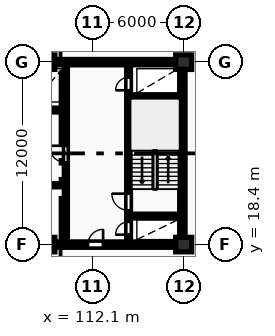
"""IFC4 building model, lengths in metres.
Left out: names, types, materials, properties, quantities, classifications, styles, units other than length and angle.
Written with IfcOpenShell. Run it as: python <this file> out.ifc"""

import sys

from ifc_helpers import new_model, si_unit, direction, frame, frame_2d, origin, origin_2d, place, context, subcontext, project, spatial, rectangle, extrude, element, fill, save


model = new_model("IFC4")
c1 = context("Model", 3, precision=1e-05, world=origin(), true_north=direction((0.0, 1.0)))
c2 = subcontext(c1, "Body", "Model", "MODEL_VIEW")
j1 = project(units=[si_unit("LENGTHUNIT", "METRE"), si_unit("PLANEANGLEUNIT", "RADIAN")], contexts=[c1])
p1 = place(None, origin())
s1 = spatial("IfcSite", under=j1, at=p1, CompositionType="ELEMENT")
p2 = place(p1, origin())
s2 = spatial("IfcBuilding", under=s1, at=p2, CompositionType="ELEMENT")
p3 = place(p2, frame((0.0, 0.0, -3.6)))
s3 = spatial("IfcBuildingStorey", under=s2, at=p3, CompositionType="ELEMENT", Elevation=-3.6)
for number, where, z_axis, x_axis in (
    (1, (109.1, 18.4, 0.0), (0.0, 0.0, 1.0), (1.0, 0.0, 0.0)),
    (2, (109.1, 30.4, 0.0), (0.0, 0.0, 1.0), (1.0, 0.0, 0.0)),
    (3, (118.1, 18.4, 0.0), (0.0, 0.0, 1.0), (1.0, 0.0, 0.0)),
    (4, (118.1, 30.4, 0.0), (0.0, 0.0, 1.0), (1.0, 0.0, 0.0)),
):
    element("IfcColumn", number, at=place(p3, frame(where, z_axis=z_axis, x_axis=x_axis)), inside=s3, PredefinedType="COLUMN", context=c2, shape_type="SweptSolid", body=[
        extrude(rectangle(XDim=1.05, YDim=0.95, at=origin_2d()), origin(), (0.0, 0.0, 1.0), 3.6),
    ])
p4 = place(p3, frame((81.925, 30.4, 0.0), z_axis=(0.0, 0.0, 1.0), x_axis=(1.0, 0.0, 0.0)))
e5 = element("IfcWall", 5, at=p4, inside=s3, PredefinedType="SHEAR", context=c2, shape_type="SweptSolid", body=[
    extrude(rectangle(XDim=36.265, YDim=0.35, at=frame_2d((18.132, 0.0))), origin(), (0.0, 0.0, 1.0), 3.6),
])
p5 = place(p3, frame((118.015, 18.575, 0.0), z_axis=(0.0, 0.0, 1.0), x_axis=(0.0, 1.0, 0.0)))
e6 = element("IfcWall", 6, at=p5, inside=s3, PredefinedType="SHEAR", context=c2, shape_type="SweptSolid", body=[
    extrude(rectangle(XDim=11.65, YDim=0.35, at=frame_2d((5.825, 0.0))), origin(), (0.0, 0.0, 1.0), 3.6),
])
p6 = place(p3, frame((81.925, 18.4, 0.0), z_axis=(0.0, 0.0, 1.0), x_axis=(1.0, 0.0, 0.0)))
e7 = element("IfcWall", 7, at=p6, inside=s3, PredefinedType="SHEAR", context=c2, shape_type="SweptSolid", body=[
    extrude(rectangle(XDim=36.265, YDim=0.35, at=frame_2d((18.132, 0.0))), origin(), (0.0, 0.0, 1.0), 3.6),
])
p7 = place(p6, frame((5.675, 0.0, 0.0)))
e8 = element("IfcOpeningElement", 8, at=p7, cuts=e7, PredefinedType="OPENING", context=c2, shape_type="SweptSolid", body=[
    extrude(rectangle(XDim=1.0, YDim=2.15, at=frame_2d((0.5, 1.075))), frame((0.0, 0.185, 0.0), z_axis=(0.0, -1.0, 0.0), x_axis=(1.0, 0.0, 0.0)), (0.0, 0.0, 1.0), 0.37),
])
p8 = place(p6, frame((21.925, 0.0, 0.0)))
e9 = element("IfcOpeningElement", 9, at=p8, cuts=e7, PredefinedType="OPENING", context=c2, shape_type="SweptSolid", body=[
    extrude(rectangle(XDim=1.5, YDim=2.2, at=frame_2d((0.75, 1.1))), frame((0.0, 0.185, 0.0), z_axis=(0.0, -1.0, 0.0), x_axis=(1.0, 0.0, 0.0)), (0.0, 0.0, 1.0), 0.37),
])
p9 = place(p6, frame((29.875, 0.0, 0.0)))
e10 = element("IfcOpeningElement", 10, at=p9, cuts=e7, PredefinedType="OPENING", context=c2, shape_type="SweptSolid", body=[
    extrude(rectangle(XDim=1.0, YDim=2.15, at=frame_2d((0.5, 1.075))), frame((0.0, 0.185, 0.0), z_axis=(0.0, -1.0, 0.0), x_axis=(1.0, 0.0, 0.0)), (0.0, 0.0, 1.0), 0.37),
])
p10 = place(p3, frame((99.68, 27.25, 0.0), z_axis=(0.0, 0.0, 1.0), x_axis=(1.0, 0.0, 0.0)))
e11 = element("IfcWall", 11, at=p10, inside=s3, PredefinedType="SHEAR", context=c2, shape_type="SweptSolid", body=[
    extrude(rectangle(XDim=10.54, YDim=0.25, at=frame_2d((5.27, 0.0))), origin(), (0.0, 0.0, 1.0), 3.6),
])
p11 = place(p10, frame((8.92, 0.0, 0.0)))
e12 = element("IfcOpeningElement", 12, at=p11, cuts=e11, PredefinedType="OPENING", context=c2, shape_type="SweptSolid", body=[
    extrude(rectangle(XDim=0.85, YDim=2.05, at=frame_2d((0.425, 1.025))), frame((0.0, 0.135, 0.0), z_axis=(0.0, -1.0, 0.0), x_axis=(1.0, 0.0, 0.0)), (0.0, 0.0, 1.0), 0.27),
])
p12 = place(p3, frame((91.08, 22.3, 0.0), z_axis=(0.0, 0.0, 1.0), x_axis=(1.0, 0.0, 0.0)))
e13 = element("IfcWall", 13, at=p12, inside=s3, PredefinedType="PARTITIONING", context=c2, shape_type="SweptSolid", body=[
    extrude(rectangle(XDim=19.14, YDim=0.2, at=frame_2d((9.57, 0.0))), origin(), (0.0, 0.0, 1.0), 3.3),
])
p13 = place(p12, frame((1.15, 0.0, 0.0)))
e14 = element("IfcOpeningElement", 14, at=p13, cuts=e13, PredefinedType="OPENING", context=c2, shape_type="SweptSolid", body=[
    extrude(rectangle(XDim=0.85, YDim=2.05, at=frame_2d((0.425, 1.025))), frame((0.0, 0.11, 0.0), z_axis=(0.0, -1.0, 0.0), x_axis=(1.0, 0.0, 0.0)), (0.0, 0.0, 1.0), 0.22),
])
p14 = place(p12, frame((3.2, 0.0, 0.0)))
e15 = element("IfcOpeningElement", 15, at=p14, cuts=e13, PredefinedType="OPENING", context=c2, shape_type="SweptSolid", body=[
    extrude(rectangle(XDim=0.85, YDim=2.05, at=frame_2d((0.425, 1.025))), frame((0.0, 0.11, 0.0), z_axis=(0.0, -1.0, 0.0), x_axis=(1.0, 0.0, 0.0)), (0.0, 0.0, 1.0), 0.22),
])
p15 = place(p12, frame((12.72, 0.0, 0.0)))
e16 = element("IfcOpeningElement", 16, at=p15, cuts=e13, PredefinedType="OPENING", context=c2, shape_type="SweptSolid", body=[
    extrude(rectangle(XDim=1.5, YDim=2.2, at=frame_2d((0.75, 1.1))), frame((0.0, 0.11, 0.0), z_axis=(0.0, -1.0, 0.0), x_axis=(1.0, 0.0, 0.0)), (0.0, 0.0, 1.0), 0.22),
])
p16 = place(p12, frame((6.42, 0.0, 0.0)))
e17 = element("IfcOpeningElement", 17, at=p16, cuts=e13, PredefinedType="OPENING", context=c2, shape_type="SweptSolid", body=[
    extrude(rectangle(XDim=0.92, YDim=2.08, at=frame_2d((0.46, 1.04))), frame((0.0, 0.11, 0.0), z_axis=(0.0, -1.0, 0.0), x_axis=(1.0, 0.0, 0.0)), (0.0, 0.0, 1.0), 0.22),
])
p17 = place(p12, frame((15.87, 0.0, 0.0)))
e18 = element("IfcOpeningElement", 18, at=p17, cuts=e13, PredefinedType="OPENING", context=c2, shape_type="SweptSolid", body=[
    extrude(rectangle(XDim=0.92, YDim=2.08, at=frame_2d((0.46, 1.04))), frame((0.0, 0.11, 0.0), z_axis=(0.0, -1.0, 0.0), x_axis=(1.0, 0.0, 0.0)), (0.0, 0.0, 1.0), 0.22),
])
p18 = place(p3, frame((110.35, 18.6, 0.0), z_axis=(0.0, 0.0, 1.0), x_axis=(0.0, 1.0, 0.0)))
e19 = element("IfcWall", 19, at=p18, inside=s3, PredefinedType="PARTITIONING", context=c2, shape_type="SweptSolid", body=[
    extrude(rectangle(XDim=11.6, YDim=0.2, at=frame_2d((5.8, 0.0))), origin(), (0.0, 0.0, 1.0), 3.3),
])
p19 = place(p18, frame((5.2, 0.0, 0.0)))
e20 = element("IfcOpeningElement", 20, at=p19, cuts=e19, PredefinedType="OPENING", context=c2, shape_type="SweptSolid", body=[
    extrude(rectangle(XDim=1.1, YDim=2.15, at=frame_2d((0.55, 1.075))), frame((0.0, 0.11, 0.0), z_axis=(0.0, -1.0, 0.0), x_axis=(1.0, 0.0, 0.0)), (0.0, 0.0, 1.0), 0.22),
])
p20 = place(p3, frame((114.475, 18.6, 0.0), z_axis=(0.0, 0.0, 1.0), x_axis=(0.0, 1.0, 0.0)))
e21 = element("IfcWall", 21, at=p20, inside=s3, PredefinedType="SHEAR", context=c2, shape_type="SweptSolid", body=[
    extrude(rectangle(XDim=11.6, YDim=0.25, at=frame_2d((5.8, 0.0))), origin(), (0.0, 0.0, 1.0), 3.6),
])
p21 = place(p20, frame((0.45, 0.0, 0.0)))
e22 = element("IfcOpeningElement", 22, at=p21, cuts=e21, PredefinedType="OPENING", context=c2, shape_type="SweptSolid", body=[
    extrude(rectangle(XDim=0.85, YDim=2.05, at=frame_2d((0.425, 1.025))), frame((0.0, 0.135, 0.0), z_axis=(0.0, -1.0, 0.0), x_axis=(1.0, 0.0, 0.0)), (0.0, 0.0, 1.0), 0.27),
])
p22 = place(p20, frame((2.05, 0.0, 0.0)))
e23 = element("IfcOpeningElement", 23, at=p22, cuts=e21, PredefinedType="OPENING", context=c2, shape_type="SweptSolid", body=[
    extrude(rectangle(XDim=1.1, YDim=2.1, at=frame_2d((0.55, 1.05))), frame((0.0, 0.135, 0.0), z_axis=(0.0, -1.0, 0.0), x_axis=(1.0, 0.0, 0.0)), (0.0, 0.0, 1.0), 0.27),
])
p23 = place(p20, frame((9.95, 0.0, 0.0)))
e24 = element("IfcOpeningElement", 24, at=p23, cuts=e21, PredefinedType="OPENING", context=c2, shape_type="SweptSolid", body=[
    extrude(rectangle(XDim=0.85, YDim=2.05, at=frame_2d((0.425, 1.025))), frame((0.0, 0.135, 0.0), z_axis=(0.0, -1.0, 0.0), x_axis=(1.0, 0.0, 0.0)), (0.0, 0.0, 1.0), 0.27),
])
for number, where, z_axis, x_axis in (
    (25, (114.6, 20.275, 0.0), (0.0, 0.0, 1.0), (1.0, 0.0, 0.0)),
    (26, (114.6, 28.125, 0.0), (0.0, 0.0, 1.0), (1.0, 0.0, 0.0)),
):
    element("IfcWall", number, at=place(p3, frame(where, z_axis=z_axis, x_axis=x_axis)), inside=s3, PredefinedType="SHEAR", context=c2, shape_type="SweptSolid", body=[
        extrude(rectangle(XDim=3.24, YDim=0.25, at=frame_2d((1.62, 0.0))), origin(), (0.0, 0.0, 1.0), 3.6),
    ])
p24 = place(p9, origin())
e27 = element("IfcDoor", 27, at=p24, inside=s3, OperationType="SINGLE_SWING_RIGHT", PredefinedType="DOOR", context=c2, shape_type="SweptSolid", body=[
    extrude(rectangle(XDim=1.0, YDim=2.15, at=frame_2d((0.5, 1.075))), frame((0.0, 0.025, 0.0), z_axis=(0.0, -1.0, 0.0), x_axis=(1.0, 0.0, 0.0)), (0.0, 0.0, 1.0), 0.05),
])
fill(e10, e27)
p25 = place(p19, origin())
e28 = element("IfcDoor", 28, at=p25, inside=s3, OperationType="SINGLE_SWING_RIGHT", PredefinedType="DOOR", context=c2, shape_type="SweptSolid", body=[
    extrude(rectangle(XDim=1.1, YDim=2.15, at=frame_2d((0.55, 1.075))), frame((0.0, 0.025, 0.0), z_axis=(0.0, -1.0, 0.0), x_axis=(1.0, 0.0, 0.0)), (0.0, 0.0, 1.0), 0.05),
])
fill(e20, e28)
p26 = place(p21, origin())
e29 = element("IfcDoor", 29, at=p26, inside=s3, OperationType="SINGLE_SWING_LEFT", PredefinedType="DOOR", context=c2, shape_type="SweptSolid", body=[
    extrude(rectangle(XDim=0.85, YDim=2.05, at=frame_2d((0.425, 1.025))), frame((0.0, 0.025, 0.0), z_axis=(0.0, -1.0, 0.0), x_axis=(1.0, 0.0, 0.0)), (0.0, 0.0, 1.0), 0.05),
])
fill(e22, e29)
p27 = place(p22, origin())
e30 = element("IfcDoor", 30, at=p27, inside=s3, OperationType="SINGLE_SWING_RIGHT", PredefinedType="DOOR", context=c2, shape_type="SweptSolid", body=[
    extrude(rectangle(XDim=1.1, YDim=2.1, at=frame_2d((0.55, 1.05))), frame((0.0, 0.025, 0.0), z_axis=(0.0, -1.0, 0.0), x_axis=(1.0, 0.0, 0.0)), (0.0, 0.0, 1.0), 0.05),
])
fill(e23, e30)
p28 = place(p23, origin())
e31 = element("IfcDoor", 31, at=p28, inside=s3, OperationType="SINGLE_SWING_LEFT", PredefinedType="DOOR", context=c2, shape_type="SweptSolid", body=[
    extrude(rectangle(XDim=0.85, YDim=2.05, at=frame_2d((0.425, 1.025))), frame((0.0, 0.025, 0.0), z_axis=(0.0, -1.0, 0.0), x_axis=(1.0, 0.0, 0.0)), (0.0, 0.0, 1.0), 0.05),
])
fill(e24, e31)
save(model, sys.argv[1])
